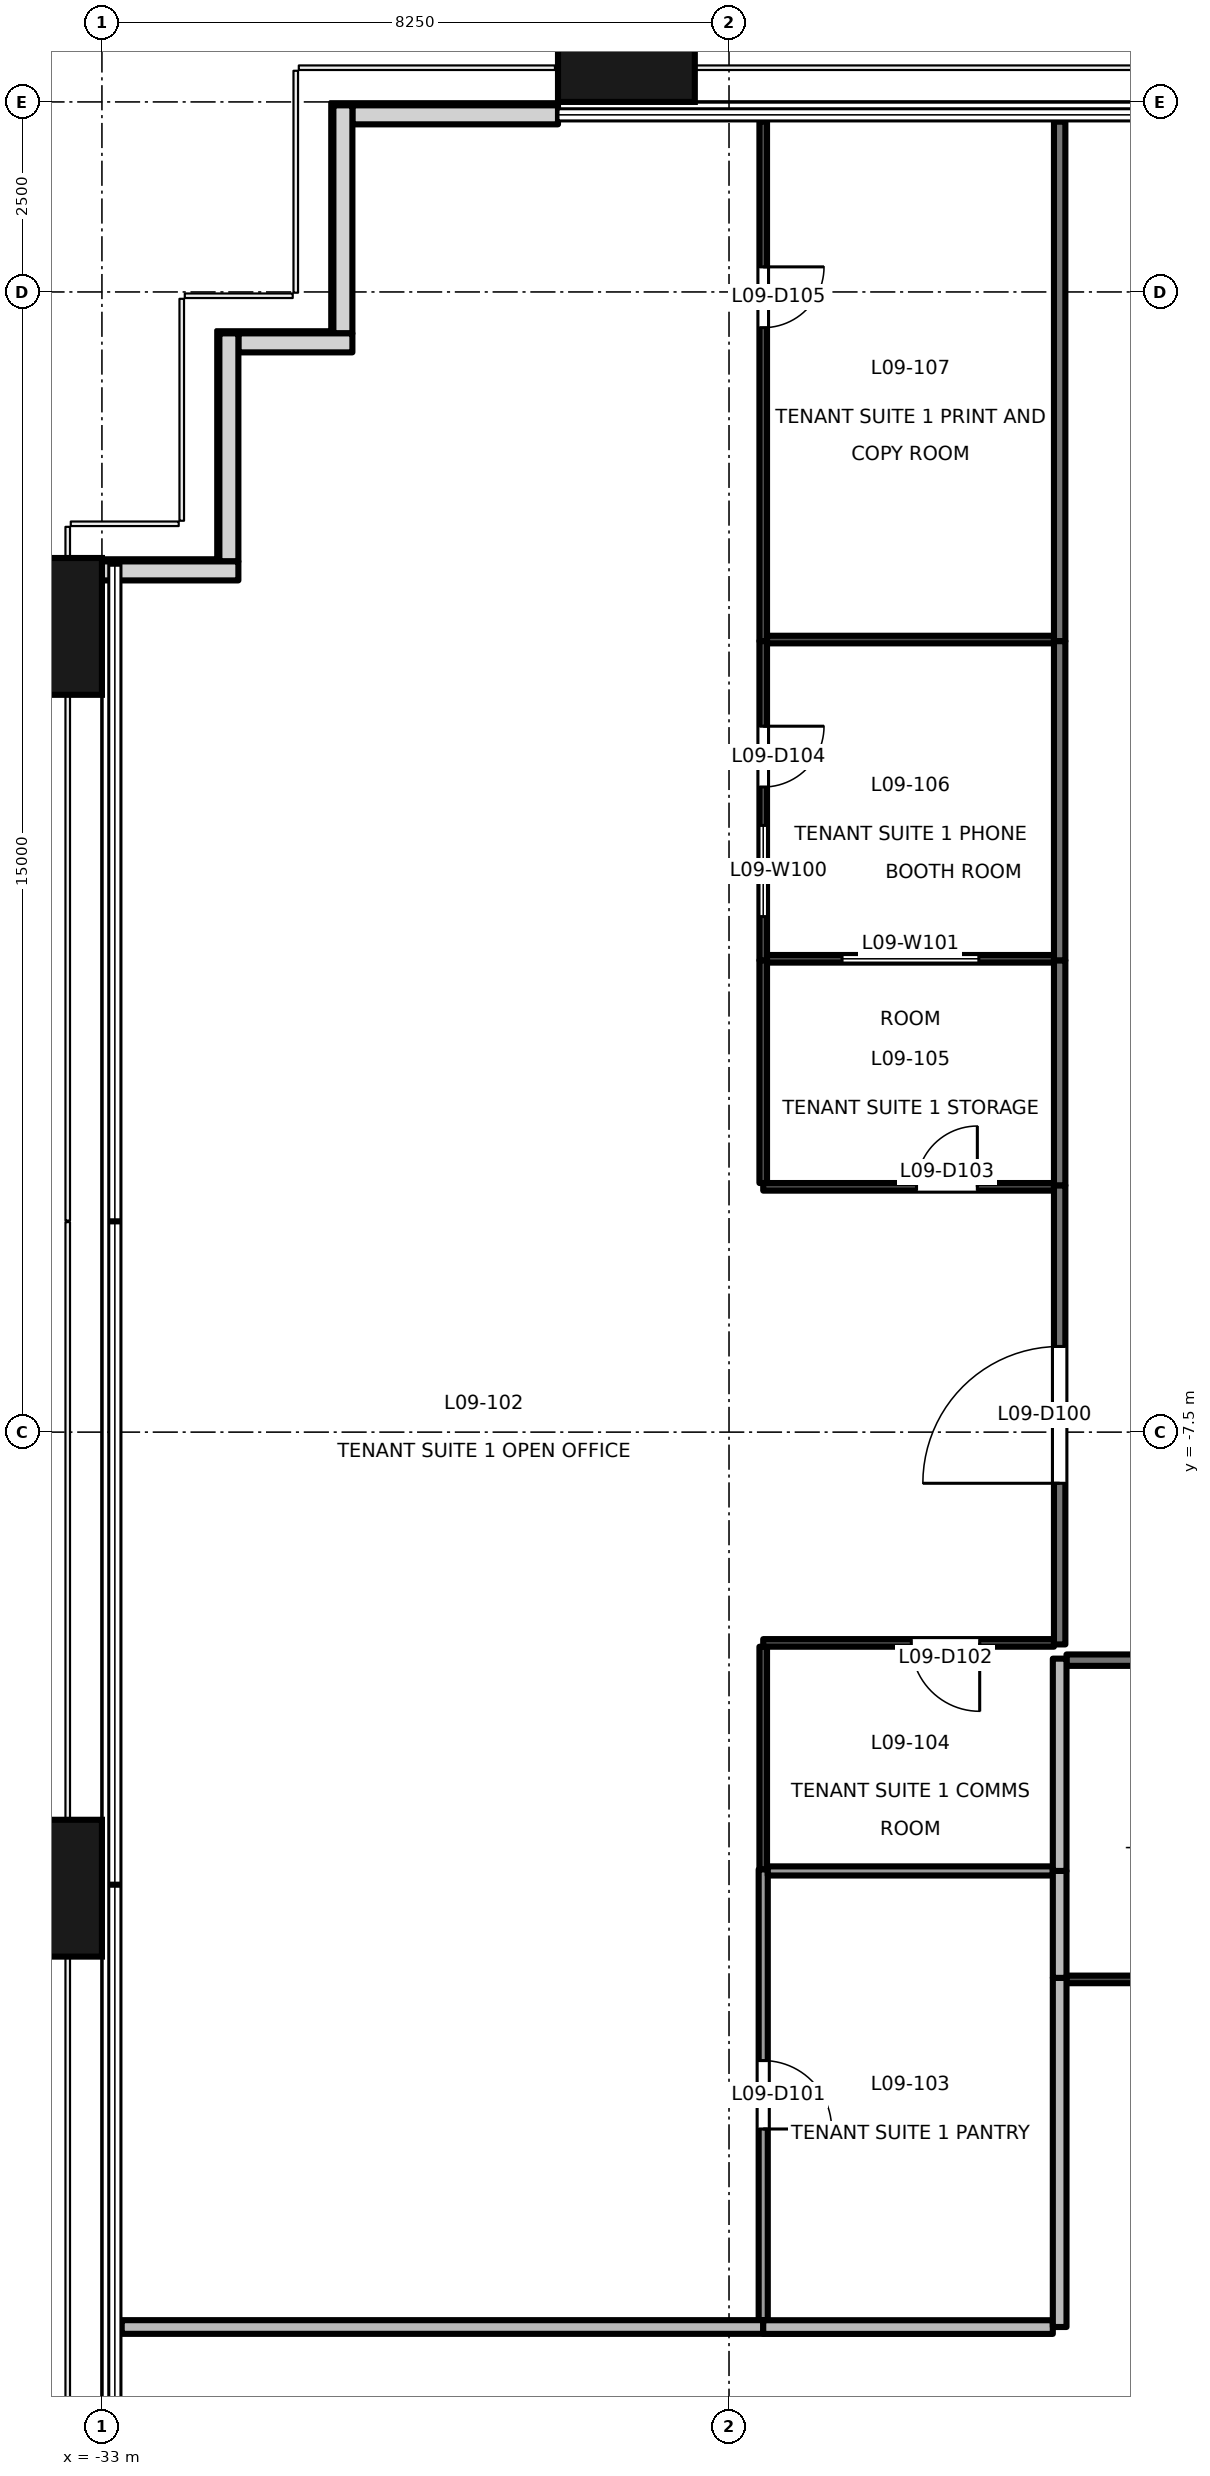
"""IFC4 building model, lengths in metres.
Left out: names, types, materials, properties, quantities, classifications, styles, units other than length and angle.
Written with IfcOpenShell. Run it as: python <this file> out.ifc"""

import sys

from ifc_helpers import new_model, si_unit, direction, frame, frame_2d, origin, origin_2d, place, context, subcontext, project, spatial, rectangle, extrude, element, fill, save


model = new_model("IFC4")
c1 = context("Model", 3, precision=1e-05, world=origin(), true_north=direction((0.0, 1.0)))
c2 = subcontext(c1, "Body", "Model", "MODEL_VIEW")
j1 = project(units=[si_unit("LENGTHUNIT", "METRE"), si_unit("PLANEANGLEUNIT", "RADIAN")], contexts=[c1])
p1 = place(None, origin())
s1 = spatial("IfcSite", under=j1, at=p1, CompositionType="ELEMENT")
p2 = place(p1, origin())
s2 = spatial("IfcBuilding", under=s1, at=p2, CompositionType="ELEMENT")
p3 = place(p2, frame((0.0, 0.0, 44.7)))
s3 = spatial("IfcBuildingStorey", under=s2, at=p3, CompositionType="ELEMENT", Elevation=44.7)
for number, where, z_axis, x_axis in (
    (1, (-33.9, -13.5, -0.2), (0.0, 0.0, 1.0), (0.0, 1.0, 0.0)),
    (2, (-33.9, 3.1, -0.2), (0.0, 0.0, 1.0), (0.0, 1.0, 0.0)),
    (3, (-26.1, 10.9, -0.2), (0.0, 0.0, 1.0), (1.0, 0.0, 0.0)),
):
    element("IfcColumn", number, at=place(p3, frame(where, z_axis=z_axis, x_axis=x_axis)), inside=s3, PredefinedType="COLUMN", context=c2, shape_type="SweptSolid", body=[
        extrude(rectangle(XDim=1.8, YDim=1.8, at=origin_2d()), origin(), (0.0, 0.0, 1.0), 4.1),
    ])
p4 = place(p3, frame((-27.0, 9.83, 0.0), z_axis=(0.0, 0.0, 1.0), x_axis=(-1.0, 0.0, 0.0)))
e4 = element("IfcWall", 4, at=p4, inside=s3, PredefinedType="SOLIDWALL", context=c2, shape_type="SweptSolid", body=[
    extrude(rectangle(XDim=2.705, YDim=0.25, at=frame_2d((1.353, 0.0))), origin(), (0.0, 0.0, 1.0), 3.9),
])
p5 = place(p3, frame((-29.83, 9.955, 0.0), z_axis=(0.0, 0.0, 1.0), x_axis=(0.0, -1.0, 0.0)))
e5 = element("IfcWall", 5, at=p5, inside=s3, PredefinedType="SOLIDWALL", context=c2, shape_type="SweptSolid", body=[
    extrude(rectangle(XDim=3.0, YDim=0.25, at=frame_2d((1.5, 0.0))), origin(), (0.0, 0.0, 1.0), 3.9),
])
p6 = place(p3, frame((-29.705, 6.83, 0.0), z_axis=(0.0, 0.0, 1.0), x_axis=(-1.0, 0.0, 0.0)))
e6 = element("IfcWall", 6, at=p6, inside=s3, PredefinedType="SOLIDWALL", context=c2, shape_type="SweptSolid", body=[
    extrude(rectangle(XDim=1.5, YDim=0.25, at=frame_2d((0.75, 0.0))), origin(), (0.0, 0.0, 1.0), 3.9),
])
p7 = place(p3, frame((-31.33, 6.955, 0.0), z_axis=(0.0, 0.0, 1.0), x_axis=(0.0, -1.0, 0.0)))
e7 = element("IfcWall", 7, at=p7, inside=s3, PredefinedType="SOLIDWALL", context=c2, shape_type="SweptSolid", body=[
    extrude(rectangle(XDim=3.0, YDim=0.25, at=frame_2d((1.5, 0.0))), origin(), (0.0, 0.0, 1.0), 3.9),
])
p8 = place(p3, frame((-31.205, 3.83, 0.0), z_axis=(0.0, 0.0, 1.0), x_axis=(-1.0, 0.0, 0.0)))
e8 = element("IfcWall", 8, at=p8, inside=s3, PredefinedType="SOLIDWALL", context=c2, shape_type="SweptSolid", body=[
    extrude(rectangle(XDim=1.8, YDim=0.25, at=frame_2d((0.9, 0.0))), origin(), (0.0, 0.0, 1.0), 3.9),
])
p9 = place(p3, frame((-20.4, -10.293, 0.0), z_axis=(0.0, 0.0, 1.0), x_axis=(0.0, 1.0, 0.0)))
e9 = element("IfcWall", 9, at=p9, inside=s3, PredefinedType="PARTITIONING", context=c2, shape_type="SweptSolid", body=[
    extrude(rectangle(XDim=6.04, YDim=0.15, at=frame_2d((3.02, 0.0))), origin(), (0.0, 0.0, 1.0), 3.3),
])
p10 = place(p9, frame((2.12, 0.0, 0.0)))
e10 = element("IfcOpeningElement", 10, at=p10, cuts=e9, PredefinedType="OPENING", context=c2, shape_type="SweptSolid", body=[
    extrude(rectangle(XDim=1.8, YDim=2.1, at=frame_2d((0.9, 1.05))), frame((0.0, 0.085, 0.0), z_axis=(0.0, -1.0, 0.0), x_axis=(1.0, 0.0, 0.0)), (0.0, 0.0, 1.0), 0.171),
])
p11 = place(p3, frame((-20.4, -4.253, 0.0), z_axis=(0.0, 0.0, 1.0), x_axis=(0.0, 1.0, 0.0)))
e11 = element("IfcWall", 11, at=p11, inside=s3, PredefinedType="PARTITIONING", context=c2, shape_type="SweptSolid", body=[
    extrude(rectangle(XDim=2.96, YDim=0.15, at=frame_2d((1.48, 0.0))), origin(), (0.0, 0.0, 1.0), 3.9),
])
p12 = place(p3, frame((-20.4, -1.293, 0.0), z_axis=(0.0, 0.0, 1.0), x_axis=(0.0, 1.0, 0.0)))
e12 = element("IfcWall", 12, at=p12, inside=s3, PredefinedType="PARTITIONING", context=c2, shape_type="SweptSolid", body=[
    extrude(rectangle(XDim=4.2, YDim=0.15, at=frame_2d((2.1, 0.0))), origin(), (0.0, 0.0, 1.0), 3.3),
])
p13 = place(p3, frame((-20.4, 2.907, 0.0), z_axis=(0.0, 0.0, 1.0), x_axis=(0.0, 1.0, 0.0)))
e13 = element("IfcWall", 13, at=p13, inside=s3, PredefinedType="PARTITIONING", context=c2, shape_type="SweptSolid", body=[
    extrude(rectangle(XDim=6.833, YDim=0.15, at=frame_2d((3.417, 0.0))), origin(), (0.0, 0.0, 1.0), 3.9),
])
p14 = place(p3, frame((-14.68, -10.5, 0.0), z_axis=(0.0, 0.0, 1.0), x_axis=(-1.0, 0.0, 0.0)))
e14 = element("IfcWall", 14, at=p14, inside=s3, PredefinedType="PARTITIONING", context=c2, shape_type="SweptSolid", body=[
    extrude(rectangle(XDim=5.63, YDim=0.15, at=frame_2d((2.815, 0.0))), origin(), (0.0, 0.0, 1.0), 2.5),
])
p15 = place(p3, frame((-24.3, -13.253, 0.0), z_axis=(0.0, 0.0, 1.0), x_axis=(0.0, -1.0, 0.0)))
e15 = element("IfcWall", 15, at=p15, inside=s3, PredefinedType="PARTITIONING", context=c2, shape_type="SweptSolid", body=[
    extrude(rectangle(XDim=5.93, YDim=0.12, at=frame_2d((2.965, 0.0))), origin(), (0.0, 0.0, 1.0), 3.3),
])
p16 = place(p15, frame((2.515, 0.0, 0.0)))
e16 = element("IfcOpeningElement", 16, at=p16, cuts=e15, PredefinedType="OPENING", context=c2, shape_type="SweptSolid", body=[
    extrude(rectangle(XDim=0.9, YDim=2.1, at=frame_2d((0.45, 1.05))), frame((0.0, 0.071, 0.0), z_axis=(0.0, -1.0, 0.0), x_axis=(1.0, 0.0, 0.0)), (0.0, 0.0, 1.0), 0.141),
])
p17 = place(p3, frame((-24.3, -10.323, 0.0), z_axis=(0.0, 0.0, 1.0), x_axis=(0.0, -1.0, 0.0)))
e17 = element("IfcWall", 17, at=p17, inside=s3, PredefinedType="PARTITIONING", context=c2, shape_type="SweptSolid", body=[
    extrude(rectangle(XDim=2.93, YDim=0.1, at=frame_2d((1.465, 0.0))), origin(), (0.0, 0.0, 1.0), 3.9),
])
p18 = place(p3, frame((-20.475, -10.273, 0.0), z_axis=(0.0, 0.0, 1.0), x_axis=(-1.0, 0.0, 0.0)))
e18 = element("IfcWall", 18, at=p18, inside=s3, PredefinedType="PARTITIONING", context=c2, shape_type="SweptSolid", body=[
    extrude(rectangle(XDim=3.825, YDim=0.1, at=frame_2d((1.913, 0.0))), origin(), (0.0, 0.0, 1.0), 3.9),
])
p19 = place(p18, frame((0.977, 0.0, 0.0)))
e19 = element("IfcOpeningElement", 19, at=p19, cuts=e18, PredefinedType="OPENING", context=c2, shape_type="SweptSolid", body=[
    extrude(rectangle(XDim=0.9, YDim=2.1, at=frame_2d((0.45, 1.05))), frame((0.0, 0.061, 0.0), z_axis=(0.0, -1.0, 0.0), x_axis=(1.0, 0.0, 0.0)), (0.0, 0.0, 1.0), 0.121),
])
p20 = place(p3, frame((-24.3, -1.293, 0.0), z_axis=(0.0, 0.0, 1.0), x_axis=(0.0, -1.0, 0.0)))
e20 = element("IfcWall", 20, at=p20, inside=s3, PredefinedType="PARTITIONING", context=c2, shape_type="SweptSolid", body=[
    extrude(rectangle(XDim=2.93, YDim=0.1, at=frame_2d((1.465, 0.0))), origin(), (0.0, 0.0, 1.0), 3.9),
])
p21 = place(p3, frame((-24.3, -4.273, 0.0), z_axis=(0.0, 0.0, 1.0), x_axis=(1.0, 0.0, 0.0)))
e21 = element("IfcWall", 21, at=p21, inside=s3, PredefinedType="PARTITIONING", context=c2, shape_type="SweptSolid", body=[
    extrude(rectangle(XDim=3.825, YDim=0.1, at=frame_2d((1.913, 0.0))), origin(), (0.0, 0.0, 1.0), 3.9),
])
p22 = place(p21, frame((2.017, 0.0, 0.0)))
e22 = element("IfcOpeningElement", 22, at=p22, cuts=e21, PredefinedType="OPENING", context=c2, shape_type="SweptSolid", body=[
    extrude(rectangle(XDim=0.8, YDim=2.1, at=frame_2d((0.4, 1.05))), frame((0.0, 0.061, 0.0), z_axis=(0.0, -1.0, 0.0), x_axis=(1.0, 0.0, 0.0)), (0.0, 0.0, 1.0), 0.121),
])
p23 = place(p3, frame((-24.3, 2.907, 0.0), z_axis=(0.0, 0.0, 1.0), x_axis=(0.0, -1.0, 0.0)))
e23 = element("IfcWall", 23, at=p23, inside=s3, PredefinedType="PARTITIONING", context=c2, shape_type="SweptSolid", body=[
    extrude(rectangle(XDim=4.2, YDim=0.1, at=frame_2d((2.1, 0.0))), origin(), (0.0, 0.0, 1.0), 3.3),
])
p24 = place(p23, frame((1.12, 0.0, 0.0)))
e24 = element("IfcOpeningElement", 24, at=p24, cuts=e23, PredefinedType="OPENING", context=c2, shape_type="SweptSolid", body=[
    extrude(rectangle(XDim=0.8, YDim=2.1, at=frame_2d((0.4, 1.05))), frame((0.0, 0.061, 0.0), z_axis=(0.0, -1.0, 0.0), x_axis=(1.0, 0.0, 0.0)), (0.0, 0.0, 1.0), 0.121),
])
p25 = place(p23, frame((2.425, 0.0, 0.9)))
e25 = element("IfcOpeningElement", 25, at=p25, cuts=e23, PredefinedType="OPENING", context=c2, shape_type="SweptSolid", body=[
    extrude(rectangle(XDim=1.2, YDim=1.2, at=frame_2d((0.6, 0.6))), frame((0.0, 0.061, 0.0), z_axis=(0.0, -1.0, 0.0), x_axis=(1.0, 0.0, 0.0)), (0.0, 0.0, 1.0), 0.121),
])
p26 = place(p3, frame((-24.3, 9.74, 0.0), z_axis=(0.0, 0.0, 1.0), x_axis=(0.0, -1.0, 0.0)))
e26 = element("IfcWall", 26, at=p26, inside=s3, PredefinedType="PARTITIONING", context=c2, shape_type="SweptSolid", body=[
    extrude(rectangle(XDim=6.833, YDim=0.1, at=frame_2d((3.417, 0.0))), origin(), (0.0, 0.0, 1.0), 3.9),
])
p27 = place(p26, frame((1.91, 0.0, 0.0)))
e27 = element("IfcOpeningElement", 27, at=p27, cuts=e26, PredefinedType="OPENING", context=c2, shape_type="SweptSolid", body=[
    extrude(rectangle(XDim=0.8, YDim=2.1, at=frame_2d((0.4, 1.05))), frame((0.0, 0.061, 0.0), z_axis=(0.0, -1.0, 0.0), x_axis=(1.0, 0.0, 0.0)), (0.0, 0.0, 1.0), 0.121),
])
p28 = place(p3, frame((-24.3, -19.273, 0.0), z_axis=(0.0, 0.0, 1.0), x_axis=(-1.0, 0.0, 0.0)))
e28 = element("IfcWall", 28, at=p28, inside=s3, PredefinedType="PARTITIONING", context=c2, shape_type="SweptSolid", body=[
    extrude(rectangle(XDim=8.44, YDim=0.18, at=frame_2d((4.22, 0.0))), origin(), (0.0, 0.0, 1.0), 3.9),
])
p29 = place(p3, frame((-24.24, -13.273, 0.0), z_axis=(0.0, 0.0, 1.0), x_axis=(1.0, 0.0, 0.0)))
e29 = element("IfcWall", 29, at=p29, inside=s3, PredefinedType="PARTITIONING", context=c2, shape_type="SweptSolid", body=[
    extrude(rectangle(XDim=3.75, YDim=0.12, at=frame_2d((1.875, 0.0))), origin(), (0.0, 0.0, 1.0), 3.9),
])
p30 = place(p3, frame((-20.49, -19.274, 0.0), z_axis=(0.0, 0.0, 1.0), x_axis=(-1.0, 0.0, 0.0)))
e30 = element("IfcWall", 30, at=p30, inside=s3, PredefinedType="PARTITIONING", context=c2, shape_type="SweptSolid", body=[
    extrude(rectangle(XDim=3.81, YDim=0.18, at=frame_2d((1.905, 0.0))), origin(), (0.0, 0.0, 1.0), 3.9),
])
p31 = place(p3, frame((-20.4, -14.68, 0.0), z_axis=(0.0, 0.0, 1.0), x_axis=(0.0, -1.0, 0.0)))
e31 = element("IfcWall", 31, at=p31, inside=s3, PredefinedType="PARTITIONING", context=c2, shape_type="SweptSolid", body=[
    extrude(rectangle(XDim=4.593, YDim=0.18, at=frame_2d((2.296, 0.0))), origin(), (0.0, 0.0, 1.0), 3.3),
])
p32 = place(p3, frame((-20.4, -13.273, 0.0), z_axis=(0.0, 0.0, 1.0), x_axis=(0.0, -1.0, 0.0)))
e32 = element("IfcWall", 32, at=p32, inside=s3, PredefinedType="PARTITIONING", context=c2, shape_type="SweptSolid", body=[
    extrude(rectangle(XDim=1.407, YDim=0.18, at=frame_2d((0.704, 0.0))), origin(), (0.0, 0.0, 1.0), 3.3),
])
p33 = place(p3, frame((-20.4, -10.48, 0.0), z_axis=(0.0, 0.0, 1.0), x_axis=(0.0, -1.0, 0.0)))
e33 = element("IfcWall", 33, at=p33, inside=s3, PredefinedType="PARTITIONING", context=c2, shape_type="SweptSolid", body=[
    extrude(rectangle(XDim=2.793, YDim=0.18, at=frame_2d((1.396, 0.0))), origin(), (0.0, 0.0, 1.0), 3.9),
])
p34 = place(p3, frame((-24.25, -1.273, 0.0), z_axis=(0.0, 0.0, 1.0), x_axis=(1.0, 0.0, 0.0)))
e34 = element("IfcWall", 34, at=p34, inside=s3, PredefinedType="PARTITIONING", context=c2, shape_type="SweptSolid", body=[
    extrude(rectangle(XDim=3.775, YDim=0.1, at=frame_2d((1.887, 0.0))), origin(), (0.0, 0.0, 1.0), 3.9),
])
p35 = place(p34, frame((0.987, 0.0, 0.9)))
e35 = element("IfcOpeningElement", 35, at=p35, cuts=e34, PredefinedType="OPENING", context=c2, shape_type="SweptSolid", body=[
    extrude(rectangle(XDim=1.8, YDim=1.2, at=frame_2d((0.9, 0.6))), frame((0.0, 0.061, 0.0), z_axis=(0.0, -1.0, 0.0), x_axis=(1.0, 0.0, 0.0)), (0.0, 0.0, 1.0), 0.121),
])
p36 = place(p3, frame((-24.25, 2.927, 0.0), z_axis=(0.0, 0.0, 1.0), x_axis=(1.0, 0.0, 0.0)))
e36 = element("IfcWall", 36, at=p36, inside=s3, PredefinedType="PARTITIONING", context=c2, shape_type="SweptSolid", body=[
    extrude(rectangle(XDim=3.775, YDim=0.1, at=frame_2d((1.887, 0.0))), origin(), (0.0, 0.0, 1.0), 3.9),
])
p37 = place(p3, frame((-20.31, -14.7, 0.0), z_axis=(0.0, 0.0, 1.0), x_axis=(1.0, 0.0, 0.0)))
e37 = element("IfcWall", 37, at=p37, inside=s3, PredefinedType="PARTITIONING", context=c2, shape_type="SweptSolid", body=[
    extrude(rectangle(XDim=5.65, YDim=0.1, at=frame_2d((2.825, 0.0))), origin(), (0.0, 0.0, 1.0), 2.5),
])
p38 = place(p37, frame((3.225, 0.0, 0.0)))
e38 = element("IfcOpeningElement", 38, at=p38, cuts=e37, PredefinedType="OPENING", context=c2, shape_type="SweptSolid", body=[
    extrude(rectangle(XDim=0.9, YDim=2.1, at=frame_2d((0.45, 1.05))), frame((0.0, 0.061, 0.0), z_axis=(0.0, -1.0, 0.0), x_axis=(1.0, 0.0, 0.0)), (0.0, 0.0, 1.0), 0.121),
])
p39 = place(p10, origin())
e39 = element("IfcDoor", 39, at=p39, inside=s3, OperationType="DOUBLE_DOOR_SINGLE_SWING", PredefinedType="DOOR", context=c2, shape_type="SweptSolid", body=[
    extrude(rectangle(XDim=1.8, YDim=2.1, at=frame_2d((0.9, 1.05))), frame((0.0, 0.025, 0.0), z_axis=(0.0, -1.0, 0.0), x_axis=(1.0, 0.0, 0.0)), (0.0, 0.0, 1.0), 0.05),
])
fill(e10, e39)
p40 = place(p16, origin())
e40 = element("IfcDoor", 40, at=p40, inside=s3, OperationType="SINGLE_SWING_RIGHT", PredefinedType="DOOR", context=c2, shape_type="SweptSolid", body=[
    extrude(rectangle(XDim=0.9, YDim=2.1, at=frame_2d((0.45, 1.05))), frame((0.0, 0.025, 0.0), z_axis=(0.0, -1.0, 0.0), x_axis=(1.0, 0.0, 0.0)), (0.0, 0.0, 1.0), 0.05),
])
fill(e16, e40)
p41 = place(p19, origin())
e41 = element("IfcDoor", 41, at=p41, inside=s3, OperationType="SINGLE_SWING_LEFT", PredefinedType="DOOR", context=c2, shape_type="SweptSolid", body=[
    extrude(rectangle(XDim=0.9, YDim=2.1, at=frame_2d((0.45, 1.05))), frame((0.0, 0.025, 0.0), z_axis=(0.0, -1.0, 0.0), x_axis=(1.0, 0.0, 0.0)), (0.0, 0.0, 1.0), 0.05),
])
fill(e19, e41)
p42 = place(p22, origin())
e42 = element("IfcDoor", 42, at=p42, inside=s3, OperationType="SINGLE_SWING_RIGHT", PredefinedType="DOOR", context=c2, shape_type="SweptSolid", body=[
    extrude(rectangle(XDim=0.8, YDim=2.1, at=frame_2d((0.4, 1.05))), frame((0.0, 0.025, 0.0), z_axis=(0.0, -1.0, 0.0), x_axis=(1.0, 0.0, 0.0)), (0.0, 0.0, 1.0), 0.05),
])
fill(e22, e42)
p43 = place(p24, origin())
e43 = element("IfcDoor", 43, at=p43, inside=s3, OperationType="SINGLE_SWING_LEFT", PredefinedType="DOOR", context=c2, shape_type="SweptSolid", body=[
    extrude(rectangle(XDim=0.8, YDim=2.1, at=frame_2d((0.4, 1.05))), frame((0.0, 0.025, 0.0), z_axis=(0.0, -1.0, 0.0), x_axis=(1.0, 0.0, 0.0)), (0.0, 0.0, 1.0), 0.05),
])
fill(e24, e43)
p44 = place(p27, origin())
e44 = element("IfcDoor", 44, at=p44, inside=s3, OperationType="SINGLE_SWING_LEFT", PredefinedType="DOOR", context=c2, shape_type="SweptSolid", body=[
    extrude(rectangle(XDim=0.8, YDim=2.1, at=frame_2d((0.4, 1.05))), frame((0.0, 0.025, 0.0), z_axis=(0.0, -1.0, 0.0), x_axis=(1.0, 0.0, 0.0)), (0.0, 0.0, 1.0), 0.05),
])
fill(e27, e44)
p45 = place(p25, origin())
e45 = element("IfcWindow", 45, at=p45, inside=s3, PartitioningType="SINGLE_PANEL", PredefinedType="WINDOW", context=c2, shape_type="SweptSolid", body=[
    extrude(rectangle(XDim=1.2, YDim=1.2, at=frame_2d((0.6, 0.6))), frame((0.0, 0.03, 0.0), z_axis=(0.0, -1.0, 0.0), x_axis=(1.0, 0.0, 0.0)), (0.0, 0.0, 1.0), 0.06),
])
fill(e25, e45)
p46 = place(p35, origin())
e46 = element("IfcWindow", 46, at=p46, inside=s3, PartitioningType="SINGLE_PANEL", PredefinedType="WINDOW", context=c2, shape_type="SweptSolid", body=[
    extrude(rectangle(XDim=1.8, YDim=1.2, at=frame_2d((0.9, 0.6))), frame((0.0, 0.03, 0.0), z_axis=(0.0, -1.0, 0.0), x_axis=(1.0, 0.0, 0.0)), (0.0, 0.0, 1.0), 0.06),
])
fill(e35, e46)
save(model, sys.argv[1])
